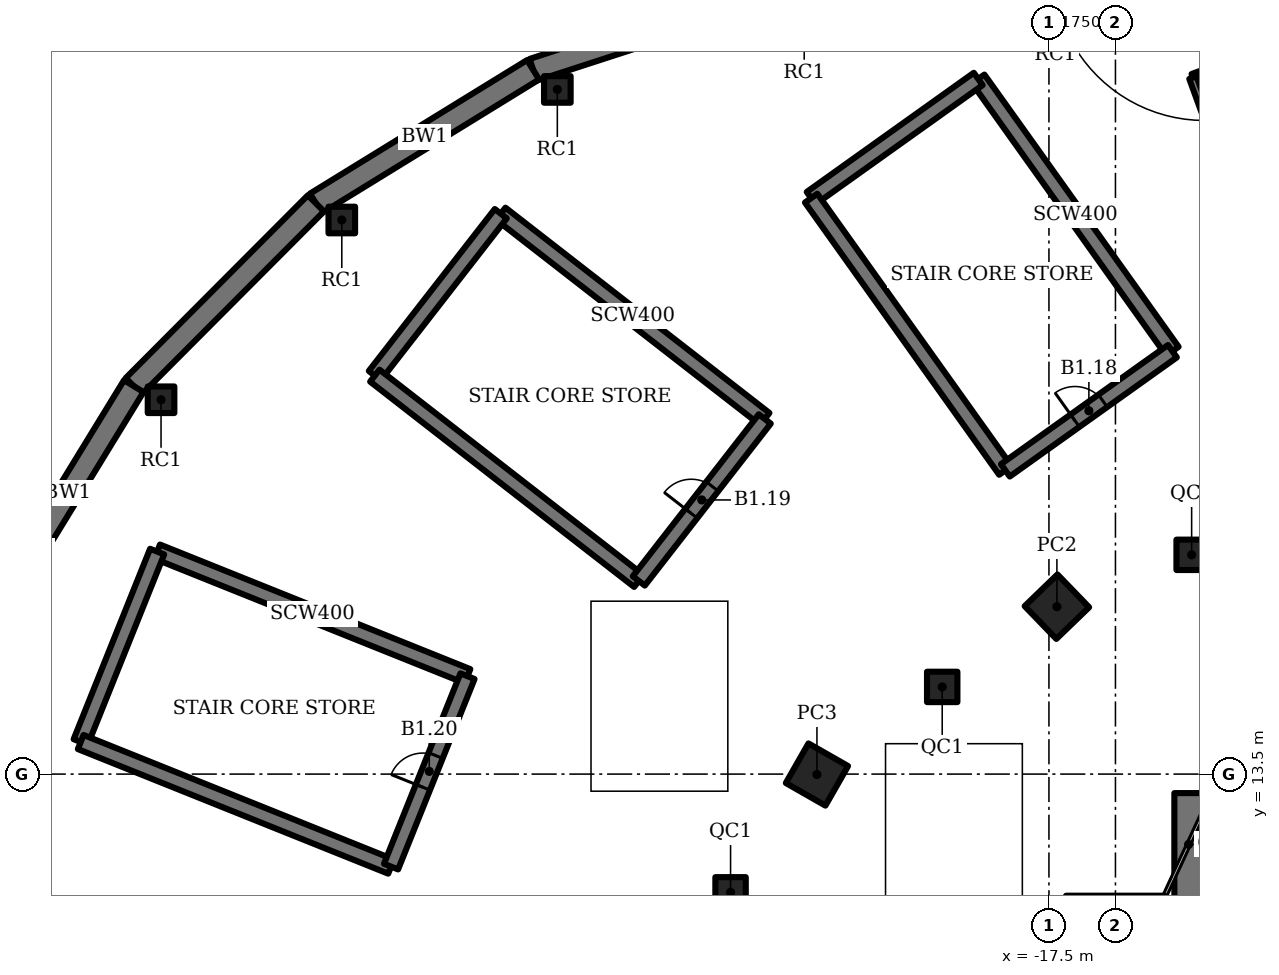
"""IFC4 building model, lengths in metres.
Left out: names, types, materials, properties, quantities, classifications, styles, units other than length and angle.
Written with IfcOpenShell. Run it as: python <this file> out.ifc"""

import sys

from ifc_helpers import new_model, si_unit, direction, frame, frame_2d, origin, origin_2d, place, context, subcontext, project, spatial, rectangle, hollow_rectangle, extrude, element, fill, save


model = new_model("IFC4")
c1 = context("Model", 3, precision=1e-05, world=origin(), true_north=direction((0.0, 1.0)))
c2 = subcontext(c1, "Body", "Model", "MODEL_VIEW")
j1 = project(units=[si_unit("LENGTHUNIT", "METRE"), si_unit("PLANEANGLEUNIT", "RADIAN")], contexts=[c1])
p1 = place(None, origin())
s1 = spatial("IfcSite", under=j1, at=p1, CompositionType="ELEMENT")
p2 = place(p1, origin())
s2 = spatial("IfcBuilding", under=s1, at=p2, CompositionType="ELEMENT")
p3 = place(p2, frame((0.0, 0.0, -5.5)))
s3 = spatial("IfcBuildingStorey", under=s2, at=p3, CompositionType="ELEMENT", Elevation=-5.5)
p4 = place(p3, frame((-17.291, 17.905, 0.0), z_axis=(0.0, 0.0, 1.0), x_axis=(0.719339800339, 0.694658370459, 0.0)))
e1 = element("IfcColumn", 1, at=p4, inside=s3, PredefinedType="COLUMN", context=c2, shape_type="SweptSolid", body=[
    extrude(hollow_rectangle(XDim=1.2, YDim=1.2, WallThickness=0.1, at=origin_2d()), origin(), (0.0, 0.0, 1.0), 5.5),
])
p5 = place(p3, frame((-23.605, 13.489, 0.0), z_axis=(0.0, 0.0, 1.0), x_axis=(0.496139221777, 0.86824298017, 0.0)))
e2 = element("IfcColumn", 2, at=p5, inside=s3, PredefinedType="COLUMN", context=c2, shape_type="SweptSolid", body=[
    extrude(hollow_rectangle(XDim=1.2, YDim=1.2, WallThickness=0.12, at=origin_2d()), origin(), (0.0, 0.0, 1.0), 5.5),
])
for number, where, z_axis, x_axis in (
    (3, (-13.745, 19.27, 0.0), (0.0, 0.0, 1.0), (1.0, 0.0, 0.0)),
    (4, (-20.309, 15.794, 0.0), (0.0, 0.0, 1.0), (1.0, 0.0, 0.0)),
    (5, (-25.878, 10.388, 0.0), (0.0, 0.0, 1.0), (1.0, 0.0, 0.0)),
):
    element("IfcColumn", number, at=place(p3, frame(where, z_axis=z_axis, x_axis=x_axis)), inside=s3, PredefinedType="COLUMN", context=c2, shape_type="SweptSolid", body=[
        extrude(hollow_rectangle(XDim=0.8, YDim=0.8, WallThickness=0.05, at=origin_2d()), origin(), (0.0, 0.0, 1.0), 5.5),
    ])
for number, where, z_axis, x_axis in (
    (6, (-36.108, 28.081, 0.0), (0.0, 0.0, 1.0), (1.0, 0.0, 0.0)),
    (7, (-30.436, 31.518, 0.0), (0.0, 0.0, 1.0), (1.0, 0.0, 0.0)),
    (8, (-40.864, 23.351, 0.0), (0.0, 0.0, 1.0), (1.0, 0.0, 0.0)),
):
    element("IfcColumn", number, at=place(p3, frame(where, z_axis=z_axis, x_axis=x_axis)), inside=s3, PredefinedType="COLUMN", context=c2, shape_type="SweptSolid", body=[
        extrude(hollow_rectangle(XDim=0.7, YDim=0.7, WallThickness=0.04, at=origin_2d()), origin(), (0.0, 0.0, 1.0), 5.5),
    ])
p6 = place(p3, frame((-13.2, 13.0, 0.0), z_axis=(0.0, 0.0, 1.0), x_axis=(0.0, -1.0, 0.0)))
e9 = element("IfcWall", 9, at=p6, inside=s3, PredefinedType="SHEAR", context=c2, shape_type="SweptSolid", body=[
    extrude(rectangle(XDim=26.0, YDim=2.0, at=frame_2d((13.0, 0.0))), origin(), (0.0, 0.0, 1.0), 5.5),
])
p7 = place(p6, frame((12.1, 0.0, 0.0)))
e10 = element("IfcOpeningElement", 10, at=p7, cuts=e9, PredefinedType="OPENING", context=c2, shape_type="SweptSolid", body=[
    extrude(rectangle(XDim=1.8, YDim=2.1, at=frame_2d((0.9, 1.05))), frame((0.0, 1.01, 0.0), z_axis=(0.0, -1.0, 0.0), x_axis=(1.0, 0.0, 0.0)), (0.0, 0.0, 1.0), 2.02),
])
p8 = place(p3, frame((-24.52, 34.162, 0.0), z_axis=(0.0, 0.0, 1.0), x_axis=(-0.951130883604, -0.308788021554, 0.0)))
e11 = element("IfcWall", 11, at=p8, inside=s3, PredefinedType="SOLIDWALL", context=c2, shape_type="SweptSolid", body=[
    extrude(rectangle(XDim=6.89, YDim=0.6, at=frame_2d((3.445, 0.0))), origin(), (0.0, 0.0, 1.0), 5.5),
])
p9 = place(p3, frame((-31.073, 32.034, 0.0), z_axis=(0.0, 0.0, 1.0), x_axis=(-0.851796965753, -0.523872054165, 0.0)))
e12 = element("IfcWall", 12, at=p9, inside=s3, PredefinedType="SOLIDWALL", context=c2, shape_type="SweptSolid", body=[
    extrude(rectangle(XDim=6.709, YDim=0.6, at=frame_2d((3.355, 0.0))), origin(), (0.0, 0.0, 1.0), 5.5),
])
p10 = place(p3, frame((-36.789, 28.52, 0.0), z_axis=(0.0, 0.0, 1.0), x_axis=(-0.705901268363, -0.708310242283, 0.0)))
e13 = element("IfcWall", 13, at=p10, inside=s3, PredefinedType="SOLIDWALL", context=c2, shape_type="SweptSolid", body=[
    extrude(rectangle(XDim=6.79, YDim=0.6, at=frame_2d((3.395, 0.0))), origin(), (0.0, 0.0, 1.0), 5.5),
])
p11 = place(p3, frame((-41.582, 23.71, 0.0), z_axis=(0.0, 0.0, 1.0), x_axis=(-0.522223921517, -0.852808405092, 0.0)))
e14 = element("IfcWall", 14, at=p11, inside=s3, PredefinedType="SOLIDWALL", context=c2, shape_type="SweptSolid", body=[
    extrude(rectangle(XDim=6.621, YDim=0.6, at=frame_2d((3.311, 0.0))), origin(), (0.0, 0.0, 1.0), 5.5),
])
p12 = place(p3, frame((-14.251, 24.629, 0.0), z_axis=(0.0, 0.0, 1.0), x_axis=(-0.580705313356, 0.814113836659, 0.0)))
e15 = element("IfcWall", 15, at=p12, inside=s3, PredefinedType="SHEAR", context=c2, shape_type="SweptSolid", body=[
    extrude(rectangle(XDim=8.8, YDim=0.4, at=frame_2d((4.4, 0.0))), origin(), (0.0, 0.0, 1.0), 5.5),
])
p13 = place(p3, frame((-19.361, 31.793, 0.0), z_axis=(0.0, 0.0, 1.0), x_axis=(-0.814121252423, -0.580694916762, 0.0)))
e16 = element("IfcWall", 16, at=p13, inside=s3, PredefinedType="SHEAR", context=c2, shape_type="SweptSolid", body=[
    extrude(rectangle(XDim=5.4, YDim=0.4, at=frame_2d((2.7, 0.0))), origin(), (0.0, 0.0, 1.0), 5.5),
])
p14 = place(p3, frame((-23.757, 28.657, 0.0), z_axis=(0.0, 0.0, 1.0), x_axis=(0.580705313356, -0.814113836659, 0.0)))
e17 = element("IfcWall", 17, at=p14, inside=s3, PredefinedType="SHEAR", context=c2, shape_type="SweptSolid", body=[
    extrude(rectangle(XDim=8.8, YDim=0.4, at=frame_2d((4.4, 0.0))), origin(), (0.0, 0.0, 1.0), 5.5),
])
p15 = place(p3, frame((-18.647, 21.493, 0.0), z_axis=(0.0, 0.0, 1.0), x_axis=(0.814121252423, 0.580694916762, 0.0)))
e18 = element("IfcWall", 18, at=p15, inside=s3, PredefinedType="SHEAR", context=c2, shape_type="SweptSolid", body=[
    extrude(rectangle(XDim=5.4, YDim=0.4, at=frame_2d((2.7, 0.0))), origin(), (0.0, 0.0, 1.0), 5.5),
])
p16 = place(p15, frame((2.25, 0.0, 0.0)))
e19 = element("IfcOpeningElement", 19, at=p16, cuts=e18, PredefinedType="OPENING", context=c2, shape_type="SweptSolid", body=[
    extrude(rectangle(XDim=0.9, YDim=2.1, at=frame_2d((0.45, 1.05))), frame((0.0, 0.21, 0.0), z_axis=(0.0, -1.0, 0.0), x_axis=(1.0, 0.0, 0.0)), (0.0, 0.0, 1.0), 0.42),
])
p17 = place(p3, frame((-24.978, 22.846, 0.0), z_axis=(0.0, 0.0, 1.0), x_axis=(-0.78938060008, 0.613904119726, 0.0)))
e20 = element("IfcWall", 20, at=p17, inside=s3, PredefinedType="SHEAR", context=c2, shape_type="SweptSolid", body=[
    extrude(rectangle(XDim=8.8, YDim=0.4, at=frame_2d((4.4, 0.0))), origin(), (0.0, 0.0, 1.0), 5.5),
])
p18 = place(p3, frame((-31.924, 28.248, 0.0), z_axis=(0.0, 0.0, 1.0), x_axis=(-0.613912443548, -0.789374126544, 0.0)))
e21 = element("IfcWall", 21, at=p18, inside=s3, PredefinedType="SHEAR", context=c2, shape_type="SweptSolid", body=[
    extrude(rectangle(XDim=5.4, YDim=0.4, at=frame_2d((2.7, 0.0))), origin(), (0.0, 0.0, 1.0), 5.5),
])
p19 = place(p3, frame((-35.239, 23.985, 0.0), z_axis=(0.0, 0.0, 1.0), x_axis=(0.78938060008, -0.613904119726, 0.0)))
e22 = element("IfcWall", 22, at=p19, inside=s3, PredefinedType="SHEAR", context=c2, shape_type="SweptSolid", body=[
    extrude(rectangle(XDim=8.8, YDim=0.4, at=frame_2d((4.4, 0.0))), origin(), (0.0, 0.0, 1.0), 5.5),
])
p20 = place(p3, frame((-28.293, 18.583, 0.0), z_axis=(0.0, 0.0, 1.0), x_axis=(0.613912443548, 0.789374126544, 0.0)))
e23 = element("IfcWall", 23, at=p20, inside=s3, PredefinedType="SHEAR", context=c2, shape_type="SweptSolid", body=[
    extrude(rectangle(XDim=5.4, YDim=0.4, at=frame_2d((2.7, 0.0))), origin(), (0.0, 0.0, 1.0), 5.5),
])
p21 = place(p20, frame((2.25, 0.0, 0.0)))
e24 = element("IfcOpeningElement", 24, at=p21, cuts=e23, PredefinedType="OPENING", context=c2, shape_type="SweptSolid", body=[
    extrude(rectangle(XDim=0.9, YDim=2.1, at=frame_2d((0.45, 1.05))), frame((0.0, 0.21, 0.0), z_axis=(0.0, -1.0, 0.0), x_axis=(1.0, 0.0, 0.0)), (0.0, 0.0, 1.0), 0.42),
])
p22 = place(p3, frame((-32.8, 16.077, 0.0), z_axis=(0.0, 0.0, 1.0), x_axis=(-0.92801678004, 0.372538395288, 0.0)))
e25 = element("IfcWall", 25, at=p22, inside=s3, PredefinedType="SHEAR", context=c2, shape_type="SweptSolid", body=[
    extrude(rectangle(XDim=8.8, YDim=0.4, at=frame_2d((4.4, 0.0))), origin(), (0.0, 0.0, 1.0), 5.5),
])
p23 = place(p3, frame((-40.967, 19.355, 0.0), z_axis=(0.0, 0.0, 1.0), x_axis=(-0.372544066459, -0.928014503414, 0.0)))
e26 = element("IfcWall", 26, at=p23, inside=s3, PredefinedType="SHEAR", context=c2, shape_type="SweptSolid", body=[
    extrude(rectangle(XDim=5.4, YDim=0.4, at=frame_2d((2.7, 0.0))), origin(), (0.0, 0.0, 1.0), 5.5),
])
p24 = place(p3, frame((-42.978, 14.344, 0.0), z_axis=(0.0, 0.0, 1.0), x_axis=(0.92801678004, -0.372538395288, 0.0)))
e27 = element("IfcWall", 27, at=p24, inside=s3, PredefinedType="SHEAR", context=c2, shape_type="SweptSolid", body=[
    extrude(rectangle(XDim=8.8, YDim=0.4, at=frame_2d((4.4, 0.0))), origin(), (0.0, 0.0, 1.0), 5.5),
])
p25 = place(p3, frame((-34.812, 11.065, 0.0), z_axis=(0.0, 0.0, 1.0), x_axis=(0.372544066459, 0.928014503414, 0.0)))
e28 = element("IfcWall", 28, at=p25, inside=s3, PredefinedType="SHEAR", context=c2, shape_type="SweptSolid", body=[
    extrude(rectangle(XDim=5.4, YDim=0.4, at=frame_2d((2.7, 0.0))), origin(), (0.0, 0.0, 1.0), 5.5),
])
p26 = place(p25, frame((2.25, 0.0, 0.0)))
e29 = element("IfcOpeningElement", 29, at=p26, cuts=e28, PredefinedType="OPENING", context=c2, shape_type="SweptSolid", body=[
    extrude(rectangle(XDim=0.9, YDim=2.1, at=frame_2d((0.45, 1.05))), frame((0.0, 0.21, 0.0), z_axis=(0.0, -1.0, 0.0), x_axis=(1.0, 0.0, 0.0)), (0.0, 0.0, 1.0), 0.42),
])
p27 = place(p3, frame((-13.2, 13.0, 0.0), z_axis=(0.0, 0.0, 1.0), x_axis=(-0.420129824888, -0.907464010437, 0.0)))
e30 = element("IfcWall", 30, at=p27, inside=s3, PredefinedType="PARTITIONING", context=c2, shape_type="SweptSolid", body=[
    extrude(rectangle(XDim=2.975, YDim=0.1, at=frame_2d((1.488, 0.0))), origin(), (0.0, 0.0, 1.0), 5.05),
])
p28 = place(p3, frame((-13.491, 31.804, 3.7), z_axis=(0.0, 0.0, 1.0), x_axis=(0.342028182899, -0.939689694581, 0.0)))
e31 = element("IfcWall", 31, at=p28, inside=s3, PredefinedType="SOLIDWALL", context=c2, shape_type="SweptSolid", body=[
    extrude(rectangle(XDim=4.4, YDim=0.2, at=frame_2d((2.2, 0.0))), origin(), (0.0, 0.0, 1.0), 1.35),
])
p29 = place(p3, frame((-9.955, 33.198, 0.0), z_axis=(0.0, 0.0, 1.0), x_axis=(-0.939686455819, -0.342037080957, 0.0)))
e32 = element("IfcWall", 32, at=p29, inside=s3, PredefinedType="SOLIDWALL", context=c2, shape_type="SweptSolid", body=[
    extrude(rectangle(XDim=4.0, YDim=0.2, at=frame_2d((2.0, 0.0))), origin(), (0.0, 0.0, 1.0), 5.05),
])
p30 = place(p3, frame((-13.713, 31.829, 0.0), z_axis=(0.0, 0.0, 1.0), x_axis=(0.342062650202, -0.939677148459, 0.0)))
e33 = element("IfcWall", 33, at=p30, inside=s3, PredefinedType="SOLIDWALL", context=c2, shape_type="SweptSolid", body=[
    extrude(rectangle(XDim=4.6, YDim=0.2, at=frame_2d((2.3, 0.0))), origin(), (0.0, 0.0, 1.0), 5.05),
])
p31 = place(p16, origin())
e34 = element("IfcDoor", 34, at=p31, inside=s3, OperationType="SINGLE_SWING_LEFT", PredefinedType="DOOR", context=c2, shape_type="SweptSolid", body=[
    extrude(rectangle(XDim=0.9, YDim=2.1, at=frame_2d((0.45, 1.05))), frame((0.0, 0.025, 0.0), z_axis=(0.0, -1.0, 0.0), x_axis=(1.0, 0.0, 0.0)), (0.0, 0.0, 1.0), 0.05),
])
fill(e19, e34)
p32 = place(p21, origin())
e35 = element("IfcDoor", 35, at=p32, inside=s3, OperationType="SINGLE_SWING_LEFT", PredefinedType="DOOR", context=c2, shape_type="SweptSolid", body=[
    extrude(rectangle(XDim=0.9, YDim=2.1, at=frame_2d((0.45, 1.05))), frame((0.0, 0.025, 0.0), z_axis=(0.0, -1.0, 0.0), x_axis=(1.0, 0.0, 0.0)), (0.0, 0.0, 1.0), 0.05),
])
fill(e24, e35)
p33 = place(p26, origin())
e36 = element("IfcDoor", 36, at=p33, inside=s3, OperationType="SINGLE_SWING_LEFT", PredefinedType="DOOR", context=c2, shape_type="SweptSolid", body=[
    extrude(rectangle(XDim=0.9, YDim=2.1, at=frame_2d((0.45, 1.05))), frame((0.0, 0.025, 0.0), z_axis=(0.0, -1.0, 0.0), x_axis=(1.0, 0.0, 0.0)), (0.0, 0.0, 1.0), 0.05),
])
fill(e29, e36)
save(model, sys.argv[1])
